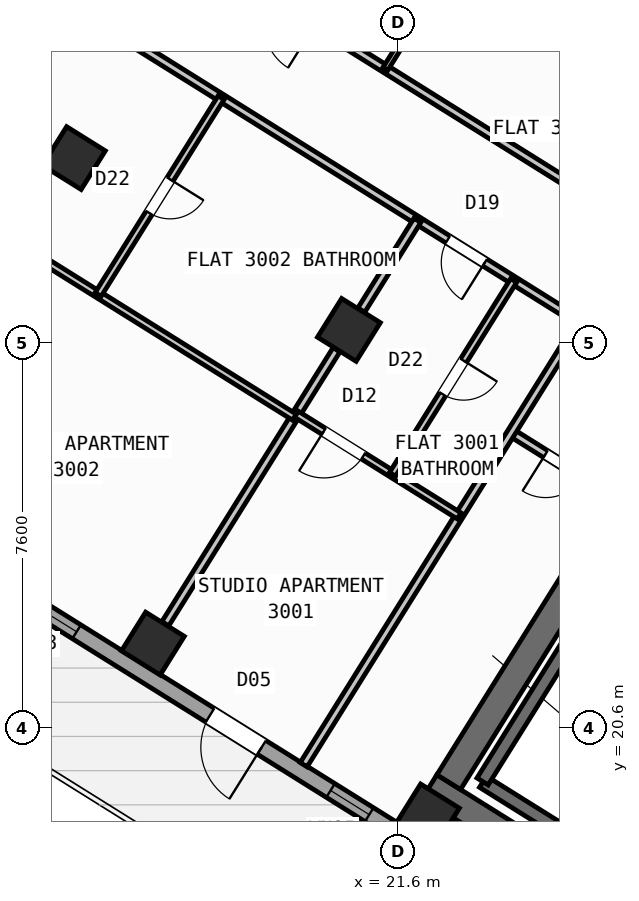
"""IFC4 building model, lengths in metres.
Left out: names, types, materials, properties, quantities, classifications, styles, units other than length and angle.
Written with IfcOpenShell. Run it as: python <this file> out.ifc"""

import sys

from ifc_helpers import new_model, si_unit, direction, frame, frame_2d, origin, origin_2d, place, context, subcontext, project, spatial, rectangle, hollow_rectangle, extrude, source, transform, mapped, element, fill, save


model = new_model("IFC4")
c1 = context("Model", 3, precision=1e-05, world=origin(), true_north=direction((0.0, 1.0)))
c2 = subcontext(c1, "Body", "Model", "MODEL_VIEW")
j1 = project(units=[si_unit("LENGTHUNIT", "METRE"), si_unit("PLANEANGLEUNIT", "RADIAN")], contexts=[c1])
p1 = place(None, origin())
s1 = spatial("IfcSite", under=j1, at=p1, CompositionType="ELEMENT")
p2 = place(p1, origin())
s2 = spatial("IfcBuilding", under=s1, at=p2, CompositionType="ELEMENT")
p3 = place(p2, frame((0.0, 0.0, 119.7)))
s3 = spatial("IfcBuildingStorey", under=s2, at=p3, CompositionType="ELEMENT", Elevation=119.7)
p4 = place(p3, frame((33.366, 12.477, 0.0), z_axis=(0.0, 0.0, 1.0), x_axis=(-0.848047359947, 0.529920442413, 0.0)))
e1 = element("IfcWall", 1, at=p4, inside=s3, PredefinedType="SHEAR", context=c2, shape_type="SweptSolid", body=[
    extrude(rectangle(XDim=13.14, YDim=0.55, at=frame_2d((6.57, 0.0))), origin(), (0.0, 0.0, 1.0), 3.35),
])
p5 = place(p3, frame((26.007, 24.976, 0.0), z_axis=(0.0, 0.0, 1.0), x_axis=(-0.529923795287, -0.848045264823, 0.0)))
e2 = element("IfcWall", 2, at=p5, inside=s3, PredefinedType="SHEAR", context=c2, shape_type="SweptSolid", body=[
    extrude(rectangle(XDim=6.425, YDim=0.55, at=frame_2d((3.212, 0.0))), origin(), (0.0, 0.0, 1.0), 3.35),
])
m1 = source(origin(), c2, "Body", "SweptSolid", [
    extrude(hollow_rectangle(XDim=0.9, YDim=0.9, WallThickness=0.036, at=origin_2d()), origin(), (0.0, 0.0, 1.0), 3.6),
])
for number, where, z_axis, x_axis in (
    (3, (22.191, 18.87, 0.0), (0.0, 0.0, 1.0), (-0.848, 0.53, 0.0)),
    (4, (20.632, 28.452, 0.0), (0.0, 0.0, 1.0), (-0.848, 0.53, 0.0)),
    (5, (16.764, 22.261, 0.0), (0.0, 0.0, 1.0), (-0.848, 0.53, 0.0)),
    (6, (15.205, 31.844, 0.0), (0.0, 0.0, 1.0), (-0.848, 0.53, 0.0)),
):
    element("IfcColumn", number, at=place(p3, frame(where, z_axis=z_axis, x_axis=x_axis)), inside=s3, PredefinedType="COLUMN", context=c2, shape_type="MappedRepresentation", body=[
        mapped(m1, transform((0.0, 0.0, 0.0), scale=1.0)),
    ])
p6 = place(p3, frame((31.76, 12.183, 0.0), z_axis=(0.0, 0.0, 1.0), x_axis=(-0.848047074256, 0.529920899612, 0.0)))
e7 = element("IfcWall", 7, at=p6, inside=s3, PredefinedType="STANDARD", context=c2, shape_type="SweptSolid", body=[
    extrude(rectangle(XDim=30.652, YDim=0.32, at=frame_2d((15.326, 0.0))), origin(), (0.0, 0.0, 1.0), 3.35),
])
p7 = place(p6, frame((15.153, 0.0, 0.0)))
e8 = element("IfcOpeningElement", 8, at=p7, cuts=e7, PredefinedType="OPENING", context=c2, shape_type="SweptSolid", body=[
    extrude(rectangle(XDim=1.2, YDim=2.15, at=frame_2d((0.6, 1.075))), frame((0.0, 0.17, 0.0), z_axis=(0.0, -1.0, 0.0), x_axis=(1.0, 0.0, 0.0)), (0.0, 0.0, 1.0), 0.34),
])
p8 = place(p6, frame((2.002, 0.0, 0.8)))
e9 = element("IfcOpeningElement", 9, at=p8, cuts=e7, PredefinedType="OPENING", context=c2, shape_type="SweptSolid", body=[
    extrude(rectangle(XDim=2.1, YDim=1.55, at=frame_2d((1.05, 0.775))), frame((0.0, 0.17, 0.0), z_axis=(0.0, -1.0, 0.0), x_axis=(1.0, 0.0, 0.0)), (0.0, 0.0, 1.0), 0.34),
])
p9 = place(p6, frame((7.206, 0.0, 0.8)))
e10 = element("IfcOpeningElement", 10, at=p9, cuts=e7, PredefinedType="OPENING", context=c2, shape_type="SweptSolid", body=[
    extrude(rectangle(XDim=2.1, YDim=1.55, at=frame_2d((1.05, 0.775))), frame((0.0, 0.17, 0.0), z_axis=(0.0, -1.0, 0.0), x_axis=(1.0, 0.0, 0.0)), (0.0, 0.0, 1.0), 0.34),
])
p10 = place(p6, frame((12.648, 0.0, 1.0)))
e11 = element("IfcOpeningElement", 11, at=p10, cuts=e7, PredefinedType="OPENING", context=c2, shape_type="SweptSolid", body=[
    extrude(rectangle(XDim=0.9, YDim=1.25, at=frame_2d((0.45, 0.625))), frame((0.0, 0.17, 0.0), z_axis=(0.0, -1.0, 0.0), x_axis=(1.0, 0.0, 0.0)), (0.0, 0.0, 1.0), 0.34),
])
p11 = place(p6, frame((19.458, 0.0, 0.95)))
e12 = element("IfcOpeningElement", 12, at=p11, cuts=e7, PredefinedType="OPENING", context=c2, shape_type="SweptSolid", body=[
    extrude(rectangle(XDim=1.2, YDim=1.4, at=frame_2d((0.6, 0.7))), frame((0.0, 0.17, 0.0), z_axis=(0.0, -1.0, 0.0), x_axis=(1.0, 0.0, 0.0)), (0.0, 0.0, 1.0), 0.34),
])
p12 = place(p6, frame((21.858, 0.0, 0.95)))
e13 = element("IfcOpeningElement", 13, at=p12, cuts=e7, PredefinedType="OPENING", context=c2, shape_type="SweptSolid", body=[
    extrude(rectangle(XDim=1.2, YDim=1.4, at=frame_2d((0.6, 0.7))), frame((0.0, 0.17, 0.0), z_axis=(0.0, -1.0, 0.0), x_axis=(1.0, 0.0, 0.0)), (0.0, 0.0, 1.0), 0.34),
])
p13 = place(p6, frame((27.266, 0.0, 0.8)))
e14 = element("IfcOpeningElement", 14, at=p13, cuts=e7, PredefinedType="OPENING", context=c2, shape_type="SweptSolid", body=[
    extrude(rectangle(XDim=2.1, YDim=1.55, at=frame_2d((1.05, 0.775))), frame((0.0, 0.17, 0.0), z_axis=(0.0, -1.0, 0.0), x_axis=(1.0, 0.0, 0.0)), (0.0, 0.0, 1.0), 0.34),
])
p14 = place(p3, frame((5.7, 28.71, 0.0), z_axis=(0.0, 0.0, 1.0), x_axis=(0.529923711467, 0.8480453172, 0.0)))
e15 = element("IfcWall", 15, at=p14, inside=s3, PredefinedType="STANDARD", context=c2, shape_type="SweptSolid", body=[
    extrude(rectangle(XDim=21.587, YDim=0.32, at=frame_2d((10.794, 0.0))), origin(), (0.0, 0.0, 1.0), 2.775),
])
p15 = place(p14, frame((2.119, 0.0, 0.8)))
e16 = element("IfcOpeningElement", 16, at=p15, cuts=e15, PredefinedType="OPENING", context=c2, shape_type="SweptSolid", body=[
    extrude(rectangle(XDim=2.1, YDim=1.55, at=frame_2d((1.05, 0.775))), frame((0.0, 0.17, 0.0), z_axis=(0.0, -1.0, 0.0), x_axis=(1.0, 0.0, 0.0)), (0.0, 0.0, 1.0), 0.34),
])
p16 = place(p14, frame((17.256, 0.0, 0.85)))
e17 = element("IfcOpeningElement", 17, at=p16, cuts=e15, PredefinedType="OPENING", context=c2, shape_type="SweptSolid", body=[
    extrude(rectangle(XDim=1.8, YDim=1.5, at=frame_2d((0.9, 0.75))), frame((0.0, 0.17, 0.0), z_axis=(0.0, -1.0, 0.0), x_axis=(1.0, 0.0, 0.0)), (0.0, 0.0, 1.0), 0.34),
])
p17 = place(p3, frame((17.424, 47.083, 0.0), z_axis=(0.0, 0.0, 1.0), x_axis=(0.848049927979, -0.529916332693, 0.0)))
e18 = element("IfcWall", 18, at=p17, inside=s3, PredefinedType="STANDARD", context=c2, shape_type="SweptSolid", body=[
    extrude(rectangle(XDim=29.223, YDim=0.32, at=frame_2d((14.612, 0.0))), origin(), (0.0, 0.0, 1.0), 3.35),
])
p18 = place(p17, frame((8.839, 0.0, 0.0)))
e19 = element("IfcOpeningElement", 19, at=p18, cuts=e18, PredefinedType="OPENING", context=c2, shape_type="SweptSolid", body=[
    extrude(rectangle(XDim=1.05, YDim=2.15, at=frame_2d((0.525, 1.075))), frame((0.0, 0.17, 0.0), z_axis=(0.0, -1.0, 0.0), x_axis=(1.0, 0.0, 0.0)), (0.0, 0.0, 1.0), 0.34),
])
p19 = place(p17, frame((0.719, 0.0, 0.85)))
e20 = element("IfcOpeningElement", 20, at=p19, cuts=e18, PredefinedType="OPENING", context=c2, shape_type="SweptSolid", body=[
    extrude(rectangle(XDim=1.8, YDim=1.5, at=frame_2d((0.9, 0.75))), frame((0.0, 0.17, 0.0), z_axis=(0.0, -1.0, 0.0), x_axis=(1.0, 0.0, 0.0)), (0.0, 0.0, 1.0), 0.34),
])
p20 = place(p17, frame((3.981, 0.0, 0.85)))
e21 = element("IfcOpeningElement", 21, at=p20, cuts=e18, PredefinedType="OPENING", context=c2, shape_type="SweptSolid", body=[
    extrude(rectangle(XDim=1.5, YDim=1.5, at=frame_2d((0.75, 0.75))), frame((0.0, 0.17, 0.0), z_axis=(0.0, -1.0, 0.0), x_axis=(1.0, 0.0, 0.0)), (0.0, 0.0, 1.0), 0.34),
])
p21 = place(p17, frame((7.021, 0.0, 0.95)))
e22 = element("IfcOpeningElement", 22, at=p21, cuts=e18, PredefinedType="OPENING", context=c2, shape_type="SweptSolid", body=[
    extrude(rectangle(XDim=1.2, YDim=1.4, at=frame_2d((0.6, 0.7))), frame((0.0, 0.17, 0.0), z_axis=(0.0, -1.0, 0.0), x_axis=(1.0, 0.0, 0.0)), (0.0, 0.0, 1.0), 0.34),
])
p22 = place(p17, frame((14.471, 0.0, 0.95)))
e23 = element("IfcOpeningElement", 23, at=p22, cuts=e18, PredefinedType="OPENING", context=c2, shape_type="SweptSolid", body=[
    extrude(rectangle(XDim=1.2, YDim=1.4, at=frame_2d((0.6, 0.7))), frame((0.0, 0.17, 0.0), z_axis=(0.0, -1.0, 0.0), x_axis=(1.0, 0.0, 0.0)), (0.0, 0.0, 1.0), 0.34),
])
p23 = place(p17, frame((17.254, 0.0, 1.0)))
e24 = element("IfcOpeningElement", 24, at=p23, cuts=e18, PredefinedType="OPENING", context=c2, shape_type="SweptSolid", body=[
    extrude(rectangle(XDim=0.9, YDim=1.25, at=frame_2d((0.45, 0.625))), frame((0.0, 0.17, 0.0), z_axis=(0.0, -1.0, 0.0), x_axis=(1.0, 0.0, 0.0)), (0.0, 0.0, 1.0), 0.34),
])
p24 = place(p17, frame((20.764, 0.0, 0.8)))
e25 = element("IfcOpeningElement", 25, at=p24, cuts=e18, PredefinedType="OPENING", context=c2, shape_type="SweptSolid", body=[
    extrude(rectangle(XDim=2.1, YDim=1.55, at=frame_2d((1.05, 0.775))), frame((0.0, 0.17, 0.0), z_axis=(0.0, -1.0, 0.0), x_axis=(1.0, 0.0, 0.0)), (0.0, 0.0, 1.0), 0.34),
])
p25 = place(p17, frame((25.403, 0.0, 0.8)))
e26 = element("IfcOpeningElement", 26, at=p25, cuts=e18, PredefinedType="OPENING", context=c2, shape_type="SweptSolid", body=[
    extrude(rectangle(XDim=2.1, YDim=1.55, at=frame_2d((1.05, 0.775))), frame((0.0, 0.17, 0.0), z_axis=(0.0, -1.0, 0.0), x_axis=(1.0, 0.0, 0.0)), (0.0, 0.0, 1.0), 0.34),
])
p26 = place(p3, frame((29.605, 15.581, 0.0), z_axis=(0.0, 0.0, 1.0), x_axis=(-0.848036911448, 0.529937163087, 0.0)))
e27 = element("IfcWall", 27, at=p26, inside=s3, PredefinedType="SHEAR", context=c2, shape_type="SweptSolid", body=[
    extrude(rectangle(XDim=7.46, YDim=0.26, at=frame_2d((3.73, 0.0))), origin(), (0.0, 0.0, 1.0), 3.35),
])
p27 = place(p3, frame((24.945, 22.22, 0.0), z_axis=(0.0, 0.0, 1.0), x_axis=(-0.529908658664, -0.84805472316, 0.0)))
e28 = element("IfcWall", 28, at=p27, inside=s3, PredefinedType="SHEAR", context=c2, shape_type="SweptSolid", body=[
    extrude(rectangle(XDim=3.16, YDim=0.26, at=frame_2d((1.58, 0.0))), origin(), (0.0, 0.0, 1.0), 3.35),
])
p28 = place(p3, frame((26.049, 25.044, 0.0), z_axis=(0.0, 0.0, 1.0), x_axis=(-0.848050851465, 0.529914854792, 0.0)))
e29 = element("IfcWall", 29, at=p28, inside=s3, PredefinedType="PARTITIONING", context=c2, shape_type="SweptSolid", body=[
    extrude(rectangle(XDim=2.61, YDim=0.16, at=frame_2d((1.305, 0.0))), origin(), (0.0, 0.0, 1.0), 2.775),
])
p29 = place(p28, frame((0.95, 0.0, 0.0)))
e30 = element("IfcOpeningElement", 30, at=p29, cuts=e29, PredefinedType="OPENING", context=c2, shape_type="SweptSolid", body=[
    extrude(rectangle(XDim=0.86, YDim=2.05, at=frame_2d((0.43, 1.025))), frame((0.0, 0.09, 0.0), z_axis=(0.0, -1.0, 0.0), x_axis=(1.0, 0.0, 0.0)), (0.0, 0.0, 1.0), 0.18),
])
p30 = place(p3, frame((25.198, 28.606, 0.0), z_axis=(0.0, 0.0, 1.0), x_axis=(-0.529926497642, -0.848043576178, 0.0)))
e31 = element("IfcWall", 31, at=p30, inside=s3, PredefinedType="PARTITIONING", context=c2, shape_type="SweptSolid", body=[
    extrude(rectangle(XDim=10.3, YDim=0.16, at=frame_2d((5.15, 0.0))), origin(), (0.0, 0.0, 1.0), 3.34),
])
p31 = place(p3, frame((26.363, 30.472, 0.0), z_axis=(0.0, 0.0, 1.0), x_axis=(-0.848052408131, 0.529912363569, 0.0)))
e32 = element("IfcWall", 32, at=p31, inside=s3, PredefinedType="PARTITIONING", context=c2, shape_type="SweptSolid", body=[
    extrude(rectangle(XDim=16.73, YDim=0.16, at=frame_2d((8.365, 0.0))), origin(), (0.0, 0.0, 1.0), 3.34),
])
p32 = place(p31, frame((7.55, 0.0, 0.0)))
e33 = element("IfcOpeningElement", 33, at=p32, cuts=e32, PredefinedType="OPENING", context=c2, shape_type="SweptSolid", body=[
    extrude(rectangle(XDim=1.0, YDim=2.1, at=frame_2d((0.5, 1.05))), frame((0.0, 0.09, 0.0), z_axis=(0.0, -1.0, 0.0), x_axis=(1.0, 0.0, 0.0)), (0.0, 0.0, 1.0), 0.18),
])
p33 = place(p31, frame((11.14, 0.0, 0.0)))
e34 = element("IfcOpeningElement", 34, at=p33, cuts=e32, PredefinedType="OPENING", context=c2, shape_type="SweptSolid", body=[
    extrude(rectangle(XDim=1.0, YDim=2.1, at=frame_2d((0.5, 1.05))), frame((0.0, 0.09, 0.0), z_axis=(0.0, -1.0, 0.0), x_axis=(1.0, 0.0, 0.0)), (0.0, 0.0, 1.0), 0.18),
])
p34 = place(p3, frame((25.198, 28.606, 0.0), z_axis=(0.0, 0.0, 1.0), x_axis=(-0.848052408131, 0.529912363569, 0.0)))
e35 = element("IfcWall", 35, at=p34, inside=s3, PredefinedType="PARTITIONING", context=c2, shape_type="SweptSolid", body=[
    extrude(rectangle(XDim=16.73, YDim=0.16, at=frame_2d((8.365, 0.0))), origin(), (0.0, 0.0, 1.0), 3.34),
])
p35 = place(p34, frame((2.22, 0.0, 0.0)))
e36 = element("IfcOpeningElement", 36, at=p35, cuts=e35, PredefinedType="OPENING", context=c2, shape_type="SweptSolid", body=[
    extrude(rectangle(XDim=0.86, YDim=2.05, at=frame_2d((0.43, 1.025))), frame((0.0, 0.09, 0.0), z_axis=(0.0, -1.0, 0.0), x_axis=(1.0, 0.0, 0.0)), (0.0, 0.0, 1.0), 0.18),
])
p36 = place(p34, frame((12.084, 0.0, 0.0)))
e37 = element("IfcOpeningElement", 37, at=p36, cuts=e35, PredefinedType="OPENING", context=c2, shape_type="SweptSolid", body=[
    extrude(rectangle(XDim=1.0, YDim=2.1, at=frame_2d((0.5, 1.05))), frame((0.0, 0.09, 0.0), z_axis=(0.0, -1.0, 0.0), x_axis=(1.0, 0.0, 0.0)), (0.0, 0.0, 1.0), 0.18),
])
p37 = place(p3, frame((21.983, 30.615, 0.0), z_axis=(0.0, 0.0, 1.0), x_axis=(-0.529956894714, -0.848024580862, 0.0)))
e38 = element("IfcWall", 38, at=p37, inside=s3, PredefinedType="PARTITIONING", context=c2, shape_type="SweptSolid", body=[
    extrude(rectangle(XDim=2.088, YDim=0.16, at=frame_2d((1.044, 0.0))), origin(), (0.0, 0.0, 1.0), 2.775),
])
p38 = place(p3, frame((20.387, 28.06, 0.0), z_axis=(0.0, 0.0, 1.0), x_axis=(-0.529902564924, -0.848058530814, 0.0)))
e39 = element("IfcWall", 39, at=p38, inside=s3, PredefinedType="PARTITIONING", context=c2, shape_type="SweptSolid", body=[
    extrude(rectangle(XDim=6.376, YDim=0.16, at=frame_2d((3.188, 0.0))), origin(), (0.0, 0.0, 1.0), 2.775),
])
p39 = place(p3, frame((22.807, 24.781, 0.0), z_axis=(0.0, 0.0, 1.0), x_axis=(-0.84803087207, 0.529946827537, 0.0)))
e40 = element("IfcWall", 40, at=p39, inside=s3, PredefinedType="PLUMBINGWALL", context=c2, shape_type="SweptSolid", body=[
    extrude(rectangle(XDim=3.79, YDim=0.14, at=frame_2d((1.895, 0.0))), origin(), (0.0, 0.0, 1.0), 3.34),
])
p40 = place(p39, frame((2.23, 0.0, 0.0)))
e41 = element("IfcOpeningElement", 41, at=p40, cuts=e40, PredefinedType="OPENING", context=c2, shape_type="SweptSolid", body=[
    extrude(rectangle(XDim=0.92, YDim=2.08, at=frame_2d((0.46, 1.04))), frame((0.0, 0.08, 0.0), z_axis=(0.0, -1.0, 0.0), x_axis=(1.0, 0.0, 0.0)), (0.0, 0.0, 1.0), 0.16),
])
p41 = place(p3, frame((23.883, 29.427, 0.0), z_axis=(0.0, 0.0, 1.0), x_axis=(-0.529950281337, -0.84802871373, 0.0)))
e42 = element("IfcWall", 42, at=p41, inside=s3, PredefinedType="PLUMBINGWALL", context=c2, shape_type="SweptSolid", body=[
    extrude(rectangle(XDim=4.51, YDim=0.14, at=frame_2d((2.255, 0.0))), origin(), (0.0, 0.0, 1.0), 2.995),
])
p42 = place(p41, frame((1.865, 0.0, 0.0)))
e43 = element("IfcOpeningElement", 43, at=p42, cuts=e42, PredefinedType="OPENING", context=c2, shape_type="SweptSolid", body=[
    extrude(rectangle(XDim=0.78, YDim=2.05, at=frame_2d((0.39, 1.025))), frame((0.0, 0.08, 0.0), z_axis=(0.0, -1.0, 0.0), x_axis=(1.0, 0.0, 0.0)), (0.0, 0.0, 1.0), 0.16),
])
p43 = place(p3, frame((19.556, 26.73, 0.0), z_axis=(0.0, 0.0, 1.0), x_axis=(-0.848043949058, 0.52992590092, 0.0)))
e44 = element("IfcWall", 44, at=p43, inside=s3, PredefinedType="PLUMBINGWALL", context=c2, shape_type="SweptSolid", body=[
    extrude(rectangle(XDim=12.92, YDim=0.14, at=frame_2d((6.46, 0.0))), origin(), (0.0, 0.0, 1.0), 3.34),
])
p44 = place(p43, frame((5.849, 0.0, 0.0)))
e45 = element("IfcOpeningElement", 45, at=p44, cuts=e44, PredefinedType="OPENING", context=c2, shape_type="SweptSolid", body=[
    extrude(rectangle(XDim=0.92, YDim=2.08, at=frame_2d((0.46, 1.04))), frame((0.0, 0.08, 0.0), z_axis=(0.0, -1.0, 0.0), x_axis=(1.0, 0.0, 0.0)), (0.0, 0.0, 1.0), 0.16),
])
p45 = place(p3, frame((18.109, 33.035, 0.0), z_axis=(0.0, 0.0, 1.0), x_axis=(-0.529893526057, -0.848064178611, 0.0)))
e46 = element("IfcWall", 46, at=p45, inside=s3, PredefinedType="PLUMBINGWALL", context=c2, shape_type="SweptSolid", body=[
    extrude(rectangle(XDim=4.58, YDim=0.14, at=frame_2d((2.29, 0.0))), origin(), (0.0, 0.0, 1.0), 3.34),
])
p46 = place(p45, frame((1.9, 0.0, 0.0)))
e47 = element("IfcOpeningElement", 47, at=p46, cuts=e46, PredefinedType="OPENING", context=c2, shape_type="SweptSolid", body=[
    extrude(rectangle(XDim=0.78, YDim=2.05, at=frame_2d((0.39, 1.025))), frame((0.0, 0.08, 0.0), z_axis=(0.0, -1.0, 0.0), x_axis=(1.0, 0.0, 0.0)), (0.0, 0.0, 1.0), 0.16),
])
p47 = place(p3, frame((26.37, 41.635, 0.0), z_axis=(0.0, 0.0, 1.0), x_axis=(-0.529917830441, -0.848048992088, 0.0)))
e48 = element("IfcWall", 48, at=p47, inside=s3, PredefinedType="PARTITIONING", context=c2, shape_type="SweptSolid", body=[
    extrude(rectangle(XDim=9.47, YDim=0.11, at=frame_2d((4.735, 0.0))), origin(), (0.0, 0.0, 1.0), 2.995),
])
p48 = place(p47, frame((7.83, 0.0, 0.0)))
e49 = element("IfcOpeningElement", 49, at=p48, cuts=e48, PredefinedType="OPENING", context=c2, shape_type="SweptSolid", body=[
    extrude(rectangle(XDim=0.78, YDim=2.05, at=frame_2d((0.39, 1.025))), frame((0.0, 0.065, 0.0), z_axis=(0.0, -1.0, 0.0), x_axis=(1.0, 0.0, 0.0)), (0.0, 0.0, 1.0), 0.13),
])
p49 = place(p47, frame((3.075, 0.0, 0.0)))
e50 = element("IfcOpeningElement", 50, at=p49, cuts=e48, PredefinedType="OPENING", context=c2, shape_type="SweptSolid", body=[
    extrude(rectangle(XDim=0.92, YDim=2.08, at=frame_2d((0.46, 1.04))), frame((0.0, 0.065, 0.0), z_axis=(0.0, -1.0, 0.0), x_axis=(1.0, 0.0, 0.0)), (0.0, 0.0, 1.0), 0.13),
])
p50 = place(p3, frame((27.635, 32.507, 0.0), z_axis=(0.0, 0.0, 1.0), x_axis=(-0.848064240775, 0.529893426567, 0.0)))
e51 = element("IfcWall", 51, at=p50, inside=s3, PredefinedType="PLUMBINGWALL", context=c2, shape_type="SweptSolid", body=[
    extrude(rectangle(XDim=3.328, YDim=0.14, at=frame_2d((1.664, 0.0))), origin(), (0.0, 0.0, 1.0), 2.775),
])
m2 = source(origin(), c2, "Body", "SweptSolid", [
    extrude(rectangle(XDim=1.2, YDim=2.15, at=frame_2d((0.6, 1.075))), frame((0.0, 0.025, 0.0), z_axis=(0.0, -1.0, 0.0), x_axis=(1.0, 0.0, 0.0)), (0.0, 0.0, 1.0), 0.05),
])
p51 = place(p7, origin())
e52 = element("IfcDoor", 52, at=p51, inside=s3, OperationType="SINGLE_SWING_LEFT", PredefinedType="DOOR", context=c2, shape_type="MappedRepresentation", body=[
    mapped(m2, transform((0.0, 0.0, 0.0), scale=1.0)),
])
fill(e8, e52)
m3 = source(origin(), c2, "Body", "SweptSolid", [
    extrude(rectangle(XDim=0.9, YDim=1.25, at=frame_2d((0.45, 0.625))), frame((0.0, 0.03, 0.0), z_axis=(0.0, -1.0, 0.0), x_axis=(1.0, 0.0, 0.0)), (0.0, 0.0, 1.0), 0.06),
])
p52 = place(p10, origin())
e53 = element("IfcWindow", 53, at=p52, inside=s3, PartitioningType="SINGLE_PANEL", PredefinedType="WINDOW", context=c2, shape_type="MappedRepresentation", body=[
    mapped(m3, transform((0.0, 0.0, 0.0), scale=1.0)),
])
fill(e11, e53)
m4 = source(origin(), c2, "Body", "SweptSolid", [
    extrude(rectangle(XDim=1.2, YDim=1.4, at=frame_2d((0.6, 0.7))), frame((0.0, 0.03, 0.0), z_axis=(0.0, -1.0, 0.0), x_axis=(1.0, 0.0, 0.0)), (0.0, 0.0, 1.0), 0.06),
])
p53 = place(p11, origin())
e54 = element("IfcWindow", 54, at=p53, inside=s3, PartitioningType="SINGLE_PANEL", PredefinedType="WINDOW", context=c2, shape_type="MappedRepresentation", body=[
    mapped(m4, transform((0.0, 0.0, 0.0), scale=1.0)),
])
fill(e12, e54)
m5 = source(origin(), c2, "Body", "SweptSolid", [
    extrude(rectangle(XDim=0.86, YDim=2.05, at=frame_2d((0.43, 1.025))), frame((0.0, 0.025, 0.0), z_axis=(0.0, -1.0, 0.0), x_axis=(1.0, 0.0, 0.0)), (0.0, 0.0, 1.0), 0.05),
])
p54 = place(p29, origin())
e55 = element("IfcDoor", 55, at=p54, inside=s3, OperationType="SINGLE_SWING_RIGHT", PredefinedType="DOOR", context=c2, shape_type="MappedRepresentation", body=[
    mapped(m5, transform((0.0, 0.0, 0.0), scale=1.0)),
])
fill(e30, e55)
p55 = place(p35, origin())
e56 = element("IfcDoor", 56, at=p55, inside=s3, OperationType="SINGLE_SWING_LEFT", PredefinedType="DOOR", context=c2, shape_type="MappedRepresentation", body=[
    mapped(m5, transform((0.0, 0.0, 0.0), scale=1.0)),
])
fill(e36, e56)
m6 = source(origin(), c2, "Body", "SweptSolid", [
    extrude(rectangle(XDim=0.92, YDim=2.08, at=frame_2d((0.46, 1.04))), frame((0.0, 0.025, 0.0), z_axis=(0.0, -1.0, 0.0), x_axis=(1.0, 0.0, 0.0)), (0.0, 0.0, 1.0), 0.05),
])
p56 = place(p40, origin())
e57 = element("IfcDoor", 57, at=p56, inside=s3, OperationType="SINGLE_SWING_RIGHT", PredefinedType="DOOR", context=c2, shape_type="MappedRepresentation", body=[
    mapped(m6, transform((0.0, 0.0, 0.0), scale=1.0)),
])
fill(e41, e57)
m7 = source(origin(), c2, "Body", "SweptSolid", [
    extrude(rectangle(XDim=0.78, YDim=2.05, at=frame_2d((0.39, 1.025))), frame((0.0, 0.025, 0.0), z_axis=(0.0, -1.0, 0.0), x_axis=(1.0, 0.0, 0.0)), (0.0, 0.0, 1.0), 0.05),
])
p57 = place(p42, origin())
e58 = element("IfcDoor", 58, at=p57, inside=s3, OperationType="SINGLE_SWING_LEFT", PredefinedType="DOOR", context=c2, shape_type="MappedRepresentation", body=[
    mapped(m7, transform((0.0, 0.0, 0.0), scale=1.0)),
])
fill(e43, e58)
p58 = place(p46, origin())
e59 = element("IfcDoor", 59, at=p58, inside=s3, OperationType="SINGLE_SWING_LEFT", PredefinedType="DOOR", context=c2, shape_type="MappedRepresentation", body=[
    mapped(m7, transform((0.0, 0.0, 0.0), scale=1.0)),
])
fill(e47, e59)
save(model, sys.argv[1])
